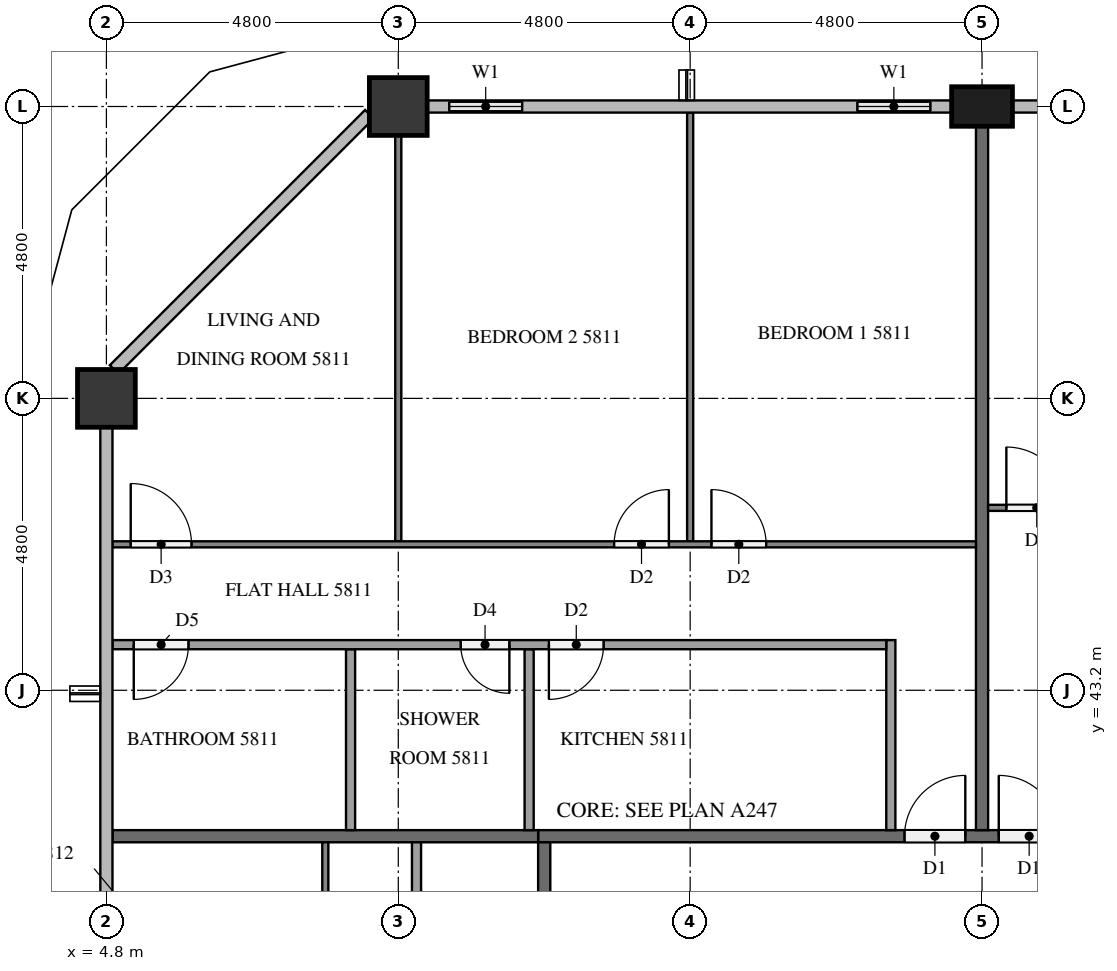
"""IFC4 building model, lengths in metres.
Left out: names, types, materials, properties, quantities, classifications, styles, units other than length and angle.
Written with IfcOpenShell. Run it as: python <this file> out.ifc"""

import sys

from ifc_helpers import new_model, si_unit, direction, frame, frame_2d, origin, origin_2d, place, context, subcontext, project, spatial, rectangle, extrude, element, fill, save


model = new_model("IFC4")
c1 = context("Model", 3, precision=1e-05, world=origin(), true_north=direction((0.0, 1.0)))
c2 = subcontext(c1, "Body", "Model", "MODEL_VIEW")
j1 = project(units=[si_unit("LENGTHUNIT", "METRE"), si_unit("PLANEANGLEUNIT", "RADIAN")], contexts=[c1])
p1 = place(None, origin())
s1 = spatial("IfcSite", under=j1, at=p1, CompositionType="ELEMENT")
p2 = place(p1, origin())
s2 = spatial("IfcBuilding", under=s1, at=p2, CompositionType="ELEMENT")
p3 = place(p2, frame((0.0, 0.0, 222.8)))
s3 = spatial("IfcBuildingStorey", under=s2, at=p3, CompositionType="ELEMENT", Elevation=222.8)
p4 = place(p3, frame((19.2, 52.8, 0.0), z_axis=(0.0, 0.0, 1.0), x_axis=(1.0, 0.0, 0.0)))
e1 = element("IfcColumn", 1, at=p4, inside=s3, PredefinedType="COLUMN", context=c2, shape_type="SweptSolid", body=[
    extrude(rectangle(XDim=1.0, YDim=0.65, at=origin_2d()), origin(), (0.0, 0.0, 1.0), 3.2),
])
for number, where, z_axis, x_axis in (
    (2, (9.6, 52.8, 0.0), (0.0, 0.0, 1.0), (1.0, 0.0, 0.0)),
    (3, (4.8, 48.0, 0.0), (0.0, 0.0, 1.0), (1.0, 0.0, 0.0)),
):
    element("IfcColumn", number, at=place(p3, frame(where, z_axis=z_axis, x_axis=x_axis)), inside=s3, PredefinedType="COLUMN", context=c2, shape_type="SweptSolid", body=[
        extrude(rectangle(XDim=0.95, YDim=0.95, at=origin_2d()), origin(), (0.0, 0.0, 1.0), 3.2),
    ])
p5 = place(p3, frame((18.7, 52.8, 0.0), z_axis=(0.0, 0.0, 1.0), x_axis=(-1.0, 0.0, 0.0)))
e4 = element("IfcWall", 4, at=p5, inside=s3, PredefinedType="SOLIDWALL", context=c2, shape_type="SweptSolid", body=[
    extrude(rectangle(XDim=1.9, YDim=0.15, at=frame_2d((0.95, 0.0))), origin(), (0.0, 0.0, 1.0), 3.2),
])
p6 = place(p5, frame((0.35, 0.0, 0.9)))
e5 = element("IfcOpeningElement", 5, at=p6, cuts=e4, PredefinedType="OPENING", context=c2, shape_type="SweptSolid", body=[
    extrude(rectangle(XDim=1.2, YDim=1.4, at=frame_2d((0.6, 0.7))), frame((0.0, 0.085, 0.0), z_axis=(0.0, -1.0, 0.0), x_axis=(1.0, 0.0, 0.0)), (0.0, 0.0, 1.0), 0.17),
])
p7 = place(p3, frame((12.0, 52.8, 0.0), z_axis=(0.0, 0.0, 1.0), x_axis=(-1.0, 0.0, 0.0)))
e6 = element("IfcWall", 6, at=p7, inside=s3, PredefinedType="SOLIDWALL", context=c2, shape_type="SweptSolid", body=[
    extrude(rectangle(XDim=1.925, YDim=0.15, at=frame_2d((0.962, 0.0))), origin(), (0.0, 0.0, 1.0), 3.2),
])
p8 = place(p7, frame((0.363, 0.0, 0.9)))
e7 = element("IfcOpeningElement", 7, at=p8, cuts=e6, PredefinedType="OPENING", context=c2, shape_type="SweptSolid", body=[
    extrude(rectangle(XDim=1.2, YDim=1.4, at=frame_2d((0.6, 0.7))), frame((0.0, 0.085, 0.0), z_axis=(0.0, -1.0, 0.0), x_axis=(1.0, 0.0, 0.0)), (0.0, 0.0, 1.0), 0.17),
])
p9 = place(p3, frame((11.9, 40.8, 0.0), z_axis=(0.0, 0.0, 1.0), x_axis=(1.0, 0.0, 0.0)))
e8 = element("IfcWall", 8, at=p9, inside=s3, PredefinedType="PARTITIONING", context=c2, shape_type="SweptSolid", body=[
    extrude(rectangle(XDim=38.6, YDim=0.2, at=frame_2d((19.3, 0.0))), origin(), (0.0, 0.0, 1.0), 3.2),
])
p10 = place(p9, frame((33.975, 0.0, 0.0)))
e9 = element("IfcOpeningElement", 9, at=p10, cuts=e8, PredefinedType="OPENING", context=c2, shape_type="SweptSolid", body=[
    extrude(rectangle(XDim=1.0, YDim=2.1, at=frame_2d((0.5, 1.05))), frame((0.0, 0.11, 0.0), z_axis=(0.0, -1.0, 0.0), x_axis=(1.0, 0.0, 0.0)), (0.0, 0.0, 1.0), 0.22),
])
p11 = place(p9, frame((14.725, 0.0, 0.0)))
e10 = element("IfcOpeningElement", 10, at=p11, cuts=e8, PredefinedType="OPENING", context=c2, shape_type="SweptSolid", body=[
    extrude(rectangle(XDim=1.1, YDim=2.1, at=frame_2d((0.55, 1.05))), frame((0.0, 0.11, 0.0), z_axis=(0.0, -1.0, 0.0), x_axis=(1.0, 0.0, 0.0)), (0.0, 0.0, 1.0), 0.22),
])
p12 = place(p9, frame((7.575, 0.0, 0.0)))
e11 = element("IfcOpeningElement", 11, at=p12, cuts=e8, PredefinedType="OPENING", context=c2, shape_type="SweptSolid", body=[
    extrude(rectangle(XDim=1.0, YDim=2.1, at=frame_2d((0.5, 1.05))), frame((0.0, 0.11, 0.0), z_axis=(0.0, -1.0, 0.0), x_axis=(1.0, 0.0, 0.0)), (0.0, 0.0, 1.0), 0.22),
])
p13 = place(p9, frame((6.025, 0.0, 0.0)))
e12 = element("IfcOpeningElement", 12, at=p13, cuts=e8, PredefinedType="OPENING", context=c2, shape_type="SweptSolid", body=[
    extrude(rectangle(XDim=1.0, YDim=2.1, at=frame_2d((0.5, 1.05))), frame((0.0, 0.11, 0.0), z_axis=(0.0, -1.0, 0.0), x_axis=(1.0, 0.0, 0.0)), (0.0, 0.0, 1.0), 0.22),
])
p14 = place(p3, frame((12.0, 12.1, 0.0), z_axis=(0.0, 0.0, 1.0), x_axis=(0.0, 1.0, 0.0)))
e13 = element("IfcWall", 13, at=p14, inside=s3, PredefinedType="PARTITIONING", context=c2, shape_type="SweptSolid", body=[
    extrude(rectangle(XDim=28.6, YDim=0.2, at=frame_2d((14.3, 0.0))), origin(), (0.0, 0.0, 1.0), 3.2),
])
p15 = place(p14, frame((9.725, 0.0, 0.0)))
e14 = element("IfcOpeningElement", 14, at=p15, cuts=e13, PredefinedType="OPENING", context=c2, shape_type="SweptSolid", body=[
    extrude(rectangle(XDim=1.1, YDim=2.1, at=frame_2d((0.55, 1.05))), frame((0.0, 0.11, 0.0), z_axis=(0.0, -1.0, 0.0), x_axis=(1.0, 0.0, 0.0)), (0.0, 0.0, 1.0), 0.22),
])
p16 = place(p14, frame((0.175, 0.0, 0.0)))
e15 = element("IfcOpeningElement", 15, at=p16, cuts=e13, PredefinedType="OPENING", context=c2, shape_type="SweptSolid", body=[
    extrude(rectangle(XDim=1.0, YDim=2.1, at=frame_2d((0.5, 1.05))), frame((0.0, 0.11, 0.0), z_axis=(0.0, -1.0, 0.0), x_axis=(1.0, 0.0, 0.0)), (0.0, 0.0, 1.0), 0.22),
])
p17 = place(p3, frame((19.2, 52.475, 0.0), z_axis=(0.0, 0.0, 1.0), x_axis=(0.0, -1.0, 0.0)))
e16 = element("IfcWall", 16, at=p17, inside=s3, PredefinedType="PARTITIONING", context=c2, shape_type="SweptSolid", body=[
    extrude(rectangle(XDim=11.575, YDim=0.2, at=frame_2d((5.788, 0.0))), origin(), (0.0, 0.0, 1.0), 3.2),
])
p18 = place(p3, frame((4.9, 40.8, 0.0), z_axis=(0.0, 0.0, 1.0), x_axis=(1.0, 0.0, 0.0)))
e17 = element("IfcWall", 17, at=p18, inside=s3, PredefinedType="PARTITIONING", context=c2, shape_type="SweptSolid", body=[
    extrude(rectangle(XDim=7.0, YDim=0.2, at=frame_2d((3.5, 0.0))), origin(), (0.0, 0.0, 1.0), 3.2),
])
p19 = place(p3, frame((19.3, 46.2, 0.0), z_axis=(0.0, 0.0, 1.0), x_axis=(1.0, 0.0, 0.0)))
e18 = element("IfcWall", 18, at=p19, inside=s3, PredefinedType="PARTITIONING", context=c2, shape_type="SweptSolid", body=[
    extrude(rectangle(XDim=7.0, YDim=0.1, at=frame_2d((3.5, 0.0))), origin(), (0.0, 0.0, 1.0), 3.2),
])
p20 = place(p19, frame((0.3, 0.0, 0.0)))
e19 = element("IfcOpeningElement", 19, at=p20, cuts=e18, PredefinedType="OPENING", context=c2, shape_type="SweptSolid", body=[
    extrude(rectangle(XDim=1.0, YDim=2.1, at=frame_2d((0.5, 1.05))), frame((0.0, 0.06, 0.0), z_axis=(0.0, -1.0, 0.0), x_axis=(1.0, 0.0, 0.0)), (0.0, 0.0, 1.0), 0.12),
])
p21 = place(p3, frame((14.4, 45.65, 0.0), z_axis=(0.0, 0.0, 1.0), x_axis=(0.0, 1.0, 0.0)))
e20 = element("IfcWall", 20, at=p21, inside=s3, PredefinedType="PARTITIONING", context=c2, shape_type="SweptSolid", body=[
    extrude(rectangle(XDim=7.05, YDim=0.1, at=frame_2d((3.525, 0.0))), origin(), (0.0, 0.0, 1.0), 3.2),
])
p22 = place(p3, frame((9.6, 45.65, 0.0), z_axis=(0.0, 0.0, 1.0), x_axis=(0.0, 1.0, 0.0)))
e21 = element("IfcWall", 21, at=p22, inside=s3, PredefinedType="PARTITIONING", context=c2, shape_type="SweptSolid", body=[
    extrude(rectangle(XDim=6.675, YDim=0.1, at=frame_2d((3.337, 0.0))), origin(), (0.0, 0.0, 1.0), 3.2),
])
p23 = place(p3, frame((4.9, 45.6, 0.0), z_axis=(0.0, 0.0, 1.0), x_axis=(1.0, 0.0, 0.0)))
e22 = element("IfcWall", 22, at=p23, inside=s3, PredefinedType="PARTITIONING", context=c2, shape_type="SweptSolid", body=[
    extrude(rectangle(XDim=14.2, YDim=0.1, at=frame_2d((7.1, 0.0))), origin(), (0.0, 0.0, 1.0), 3.2),
])
p24 = place(p23, frame((9.85, 0.0, 0.0)))
e23 = element("IfcOpeningElement", 23, at=p24, cuts=e22, PredefinedType="OPENING", context=c2, shape_type="SweptSolid", body=[
    extrude(rectangle(XDim=0.9, YDim=2.1, at=frame_2d((0.45, 1.05))), frame((0.0, 0.06, 0.0), z_axis=(0.0, -1.0, 0.0), x_axis=(1.0, 0.0, 0.0)), (0.0, 0.0, 1.0), 0.12),
])
p25 = place(p23, frame((8.25, 0.0, 0.0)))
e24 = element("IfcOpeningElement", 24, at=p25, cuts=e22, PredefinedType="OPENING", context=c2, shape_type="SweptSolid", body=[
    extrude(rectangle(XDim=0.9, YDim=2.1, at=frame_2d((0.45, 1.05))), frame((0.0, 0.06, 0.0), z_axis=(0.0, -1.0, 0.0), x_axis=(1.0, 0.0, 0.0)), (0.0, 0.0, 1.0), 0.12),
])
p26 = place(p23, frame((0.3, 0.0, 0.0)))
e25 = element("IfcOpeningElement", 25, at=p26, cuts=e22, PredefinedType="OPENING", context=c2, shape_type="SweptSolid", body=[
    extrude(rectangle(XDim=1.0, YDim=2.1, at=frame_2d((0.5, 1.05))), frame((0.0, 0.06, 0.0), z_axis=(0.0, -1.0, 0.0), x_axis=(1.0, 0.0, 0.0)), (0.0, 0.0, 1.0), 0.12),
])
for number, where, z_axis, x_axis in (
    (26, (11.752, 40.9, 0.0), (0.0, 0.0, 1.0), (0.0, 1.0, 0.0)),
    (27, (8.815, 40.9, 0.0), (0.0, 0.0, 1.0), (0.0, 1.0, 0.0)),
):
    element("IfcWall", number, at=place(p3, frame(where, z_axis=z_axis, x_axis=x_axis)), inside=s3, PredefinedType="PARTITIONING", context=c2, shape_type="SweptSolid", body=[
        extrude(rectangle(XDim=2.975, YDim=0.15, at=frame_2d((1.488, 0.0))), origin(), (0.0, 0.0, 1.0), 3.2),
    ])
p27 = place(p3, frame((17.7, 40.9, 0.0), z_axis=(0.0, 0.0, 1.0), x_axis=(0.0, 1.0, 0.0)))
e28 = element("IfcWall", 28, at=p27, inside=s3, PredefinedType="PARTITIONING", context=c2, shape_type="SweptSolid", body=[
    extrude(rectangle(XDim=3.125, YDim=0.15, at=frame_2d((1.562, 0.0))), origin(), (0.0, 0.0, 1.0), 3.2),
])
p28 = place(p3, frame((17.625, 43.95, 0.0), z_axis=(0.0, 0.0, 1.0), x_axis=(-1.0, 0.0, 0.0)))
e29 = element("IfcWall", 29, at=p28, inside=s3, PredefinedType="PARTITIONING", context=c2, shape_type="SweptSolid", body=[
    extrude(rectangle(XDim=12.725, YDim=0.15, at=frame_2d((6.363, 0.0))), origin(), (0.0, 0.0, 1.0), 3.2),
])
p29 = place(p28, frame((4.648, 0.0, 0.0)))
e30 = element("IfcOpeningElement", 30, at=p29, cuts=e29, PredefinedType="OPENING", context=c2, shape_type="SweptSolid", body=[
    extrude(rectangle(XDim=0.9, YDim=2.1, at=frame_2d((0.45, 1.05))), frame((0.0, 0.085, 0.0), z_axis=(0.0, -1.0, 0.0), x_axis=(1.0, 0.0, 0.0)), (0.0, 0.0, 1.0), 0.17),
])
p30 = place(p28, frame((6.198, 0.0, 0.0)))
e31 = element("IfcOpeningElement", 31, at=p30, cuts=e29, PredefinedType="OPENING", context=c2, shape_type="SweptSolid", body=[
    extrude(rectangle(XDim=0.8, YDim=2.1, at=frame_2d((0.4, 1.05))), frame((0.0, 0.085, 0.0), z_axis=(0.0, -1.0, 0.0), x_axis=(1.0, 0.0, 0.0)), (0.0, 0.0, 1.0), 0.17),
])
p31 = place(p28, frame((11.475, 0.0, 0.0)))
e32 = element("IfcOpeningElement", 32, at=p31, cuts=e29, PredefinedType="OPENING", context=c2, shape_type="SweptSolid", body=[
    extrude(rectangle(XDim=0.9, YDim=2.1, at=frame_2d((0.45, 1.05))), frame((0.0, 0.085, 0.0), z_axis=(0.0, -1.0, 0.0), x_axis=(1.0, 0.0, 0.0)), (0.0, 0.0, 1.0), 0.17),
])
p32 = place(p3, frame((8.4, 21.7, 0.0), z_axis=(0.0, 0.0, 1.0), x_axis=(0.0, 1.0, 0.0)))
e33 = element("IfcWall", 33, at=p32, inside=s3, PredefinedType="PARTITIONING", context=c2, shape_type="SweptSolid", body=[
    extrude(rectangle(XDim=19.0, YDim=0.1, at=frame_2d((9.5, 0.0))), origin(), (0.0, 0.0, 1.0), 3.2),
])
p33 = place(p32, frame((3.45, 0.0, 0.0)))
e34 = element("IfcOpeningElement", 34, at=p33, cuts=e33, PredefinedType="OPENING", context=c2, shape_type="SweptSolid", body=[
    extrude(rectangle(XDim=0.9, YDim=2.1, at=frame_2d((0.45, 1.05))), frame((0.0, 0.06, 0.0), z_axis=(0.0, -1.0, 0.0), x_axis=(1.0, 0.0, 0.0)), (0.0, 0.0, 1.0), 0.12),
])
p34 = place(p32, frame((5.05, 0.0, 0.0)))
e35 = element("IfcOpeningElement", 35, at=p34, cuts=e33, PredefinedType="OPENING", context=c2, shape_type="SweptSolid", body=[
    extrude(rectangle(XDim=0.9, YDim=2.1, at=frame_2d((0.45, 1.05))), frame((0.0, 0.06, 0.0), z_axis=(0.0, -1.0, 0.0), x_axis=(1.0, 0.0, 0.0)), (0.0, 0.0, 1.0), 0.12),
])
p35 = place(p32, frame((13.05, 0.0, 0.0)))
e36 = element("IfcOpeningElement", 36, at=p35, cuts=e33, PredefinedType="OPENING", context=c2, shape_type="SweptSolid", body=[
    extrude(rectangle(XDim=0.9, YDim=2.1, at=frame_2d((0.45, 1.05))), frame((0.0, 0.06, 0.0), z_axis=(0.0, -1.0, 0.0), x_axis=(1.0, 0.0, 0.0)), (0.0, 0.0, 1.0), 0.12),
])
p36 = place(p32, frame((14.65, 0.0, 0.0)))
e37 = element("IfcOpeningElement", 37, at=p36, cuts=e33, PredefinedType="OPENING", context=c2, shape_type="SweptSolid", body=[
    extrude(rectangle(XDim=1.0, YDim=2.1, at=frame_2d((0.5, 1.05))), frame((0.0, 0.06, 0.0), z_axis=(0.0, -1.0, 0.0), x_axis=(1.0, 0.0, 0.0)), (0.0, 0.0, 1.0), 0.12),
])
p37 = place(p3, frame((9.9, 40.7, 0.0), z_axis=(0.0, 0.0, 1.0), x_axis=(0.0, -1.0, 0.0)))
e38 = element("IfcWall", 38, at=p37, inside=s3, PredefinedType="PARTITIONING", context=c2, shape_type="SweptSolid", body=[
    extrude(rectangle(XDim=17.525, YDim=0.15, at=frame_2d((8.762, 0.0))), origin(), (0.0, 0.0, 1.0), 3.2),
])
p38 = place(p37, frame((14.564, 0.0, 0.0)))
e39 = element("IfcOpeningElement", 39, at=p38, cuts=e38, PredefinedType="OPENING", context=c2, shape_type="SweptSolid", body=[
    extrude(rectangle(XDim=0.8, YDim=2.1, at=frame_2d((0.4, 1.05))), frame((0.0, 0.085, 0.0), z_axis=(0.0, -1.0, 0.0), x_axis=(1.0, 0.0, 0.0)), (0.0, 0.0, 1.0), 0.17),
])
p39 = place(p37, frame((13.014, 0.0, 0.0)))
e40 = element("IfcOpeningElement", 40, at=p39, cuts=e38, PredefinedType="OPENING", context=c2, shape_type="SweptSolid", body=[
    extrude(rectangle(XDim=0.9, YDim=2.1, at=frame_2d((0.45, 1.05))), frame((0.0, 0.085, 0.0), z_axis=(0.0, -1.0, 0.0), x_axis=(1.0, 0.0, 0.0)), (0.0, 0.0, 1.0), 0.17),
])
p40 = place(p37, frame((6.897, 0.0, 0.0)))
e41 = element("IfcOpeningElement", 41, at=p40, cuts=e38, PredefinedType="OPENING", context=c2, shape_type="SweptSolid", body=[
    extrude(rectangle(XDim=0.8, YDim=2.1, at=frame_2d((0.4, 1.05))), frame((0.0, 0.085, 0.0), z_axis=(0.0, -1.0, 0.0), x_axis=(1.0, 0.0, 0.0)), (0.0, 0.0, 1.0), 0.17),
])
p41 = place(p37, frame((5.347, 0.0, 0.0)))
e42 = element("IfcOpeningElement", 42, at=p41, cuts=e38, PredefinedType="OPENING", context=c2, shape_type="SweptSolid", body=[
    extrude(rectangle(XDim=0.9, YDim=2.1, at=frame_2d((0.45, 1.05))), frame((0.0, 0.085, 0.0), z_axis=(0.0, -1.0, 0.0), x_axis=(1.0, 0.0, 0.0)), (0.0, 0.0, 1.0), 0.17),
])
p42 = place(p6, origin())
e43 = element("IfcWindow", 43, at=p42, inside=s3, PartitioningType="SINGLE_PANEL", PredefinedType="WINDOW", context=c2, shape_type="SweptSolid", body=[
    extrude(rectangle(XDim=1.2, YDim=1.4, at=frame_2d((0.6, 0.7))), frame((0.0, 0.03, 0.0), z_axis=(0.0, -1.0, 0.0), x_axis=(1.0, 0.0, 0.0)), (0.0, 0.0, 1.0), 0.06),
])
fill(e5, e43)
p43 = place(p8, origin())
e44 = element("IfcWindow", 44, at=p43, inside=s3, PartitioningType="SINGLE_PANEL", PredefinedType="WINDOW", context=c2, shape_type="SweptSolid", body=[
    extrude(rectangle(XDim=1.2, YDim=1.4, at=frame_2d((0.6, 0.7))), frame((0.0, 0.03, 0.0), z_axis=(0.0, -1.0, 0.0), x_axis=(1.0, 0.0, 0.0)), (0.0, 0.0, 1.0), 0.06),
])
fill(e7, e44)
p44 = place(p12, origin())
e45 = element("IfcDoor", 45, at=p44, inside=s3, OperationType="SINGLE_SWING_LEFT", PredefinedType="DOOR", context=c2, shape_type="SweptSolid", body=[
    extrude(rectangle(XDim=1.0, YDim=2.1, at=frame_2d((0.5, 1.05))), frame((0.0, 0.025, 0.0), z_axis=(0.0, -1.0, 0.0), x_axis=(1.0, 0.0, 0.0)), (0.0, 0.0, 1.0), 0.05),
])
fill(e11, e45)
p45 = place(p13, origin())
e46 = element("IfcDoor", 46, at=p45, inside=s3, OperationType="SINGLE_SWING_RIGHT", PredefinedType="DOOR", context=c2, shape_type="SweptSolid", body=[
    extrude(rectangle(XDim=1.0, YDim=2.1, at=frame_2d((0.5, 1.05))), frame((0.0, 0.025, 0.0), z_axis=(0.0, -1.0, 0.0), x_axis=(1.0, 0.0, 0.0)), (0.0, 0.0, 1.0), 0.05),
])
fill(e12, e46)
p46 = place(p20, origin())
e47 = element("IfcDoor", 47, at=p46, inside=s3, OperationType="SINGLE_SWING_LEFT", PredefinedType="DOOR", context=c2, shape_type="SweptSolid", body=[
    extrude(rectangle(XDim=1.0, YDim=2.1, at=frame_2d((0.5, 1.05))), frame((0.0, 0.025, 0.0), z_axis=(0.0, -1.0, 0.0), x_axis=(1.0, 0.0, 0.0)), (0.0, 0.0, 1.0), 0.05),
])
fill(e19, e47)
p47 = place(p24, origin())
e48 = element("IfcDoor", 48, at=p47, inside=s3, OperationType="SINGLE_SWING_LEFT", PredefinedType="DOOR", context=c2, shape_type="SweptSolid", body=[
    extrude(rectangle(XDim=0.9, YDim=2.1, at=frame_2d((0.45, 1.05))), frame((0.0, 0.025, 0.0), z_axis=(0.0, -1.0, 0.0), x_axis=(1.0, 0.0, 0.0)), (0.0, 0.0, 1.0), 0.05),
])
fill(e23, e48)
p48 = place(p25, origin())
e49 = element("IfcDoor", 49, at=p48, inside=s3, OperationType="SINGLE_SWING_RIGHT", PredefinedType="DOOR", context=c2, shape_type="SweptSolid", body=[
    extrude(rectangle(XDim=0.9, YDim=2.1, at=frame_2d((0.45, 1.05))), frame((0.0, 0.025, 0.0), z_axis=(0.0, -1.0, 0.0), x_axis=(1.0, 0.0, 0.0)), (0.0, 0.0, 1.0), 0.05),
])
fill(e24, e49)
p49 = place(p26, origin())
e50 = element("IfcDoor", 50, at=p49, inside=s3, OperationType="SINGLE_SWING_LEFT", PredefinedType="DOOR", context=c2, shape_type="SweptSolid", body=[
    extrude(rectangle(XDim=1.0, YDim=2.1, at=frame_2d((0.5, 1.05))), frame((0.0, 0.025, 0.0), z_axis=(0.0, -1.0, 0.0), x_axis=(1.0, 0.0, 0.0)), (0.0, 0.0, 1.0), 0.05),
])
fill(e25, e50)
p50 = place(p29, origin())
e51 = element("IfcDoor", 51, at=p50, inside=s3, OperationType="SINGLE_SWING_RIGHT", PredefinedType="DOOR", context=c2, shape_type="SweptSolid", body=[
    extrude(rectangle(XDim=0.9, YDim=2.1, at=frame_2d((0.45, 1.05))), frame((0.0, 0.025, 0.0), z_axis=(0.0, -1.0, 0.0), x_axis=(1.0, 0.0, 0.0)), (0.0, 0.0, 1.0), 0.05),
])
fill(e30, e51)
p51 = place(p30, origin())
e52 = element("IfcDoor", 52, at=p51, inside=s3, OperationType="SINGLE_SWING_LEFT", PredefinedType="DOOR", context=c2, shape_type="SweptSolid", body=[
    extrude(rectangle(XDim=0.8, YDim=2.1, at=frame_2d((0.4, 1.05))), frame((0.0, 0.025, 0.0), z_axis=(0.0, -1.0, 0.0), x_axis=(1.0, 0.0, 0.0)), (0.0, 0.0, 1.0), 0.05),
])
fill(e31, e52)
p52 = place(p31, origin())
e53 = element("IfcDoor", 53, at=p52, inside=s3, OperationType="SINGLE_SWING_RIGHT", PredefinedType="DOOR", context=c2, shape_type="SweptSolid", body=[
    extrude(rectangle(XDim=0.9, YDim=2.1, at=frame_2d((0.45, 1.05))), frame((0.0, 0.025, 0.0), z_axis=(0.0, -1.0, 0.0), x_axis=(1.0, 0.0, 0.0)), (0.0, 0.0, 1.0), 0.05),
])
fill(e32, e53)
save(model, sys.argv[1])
